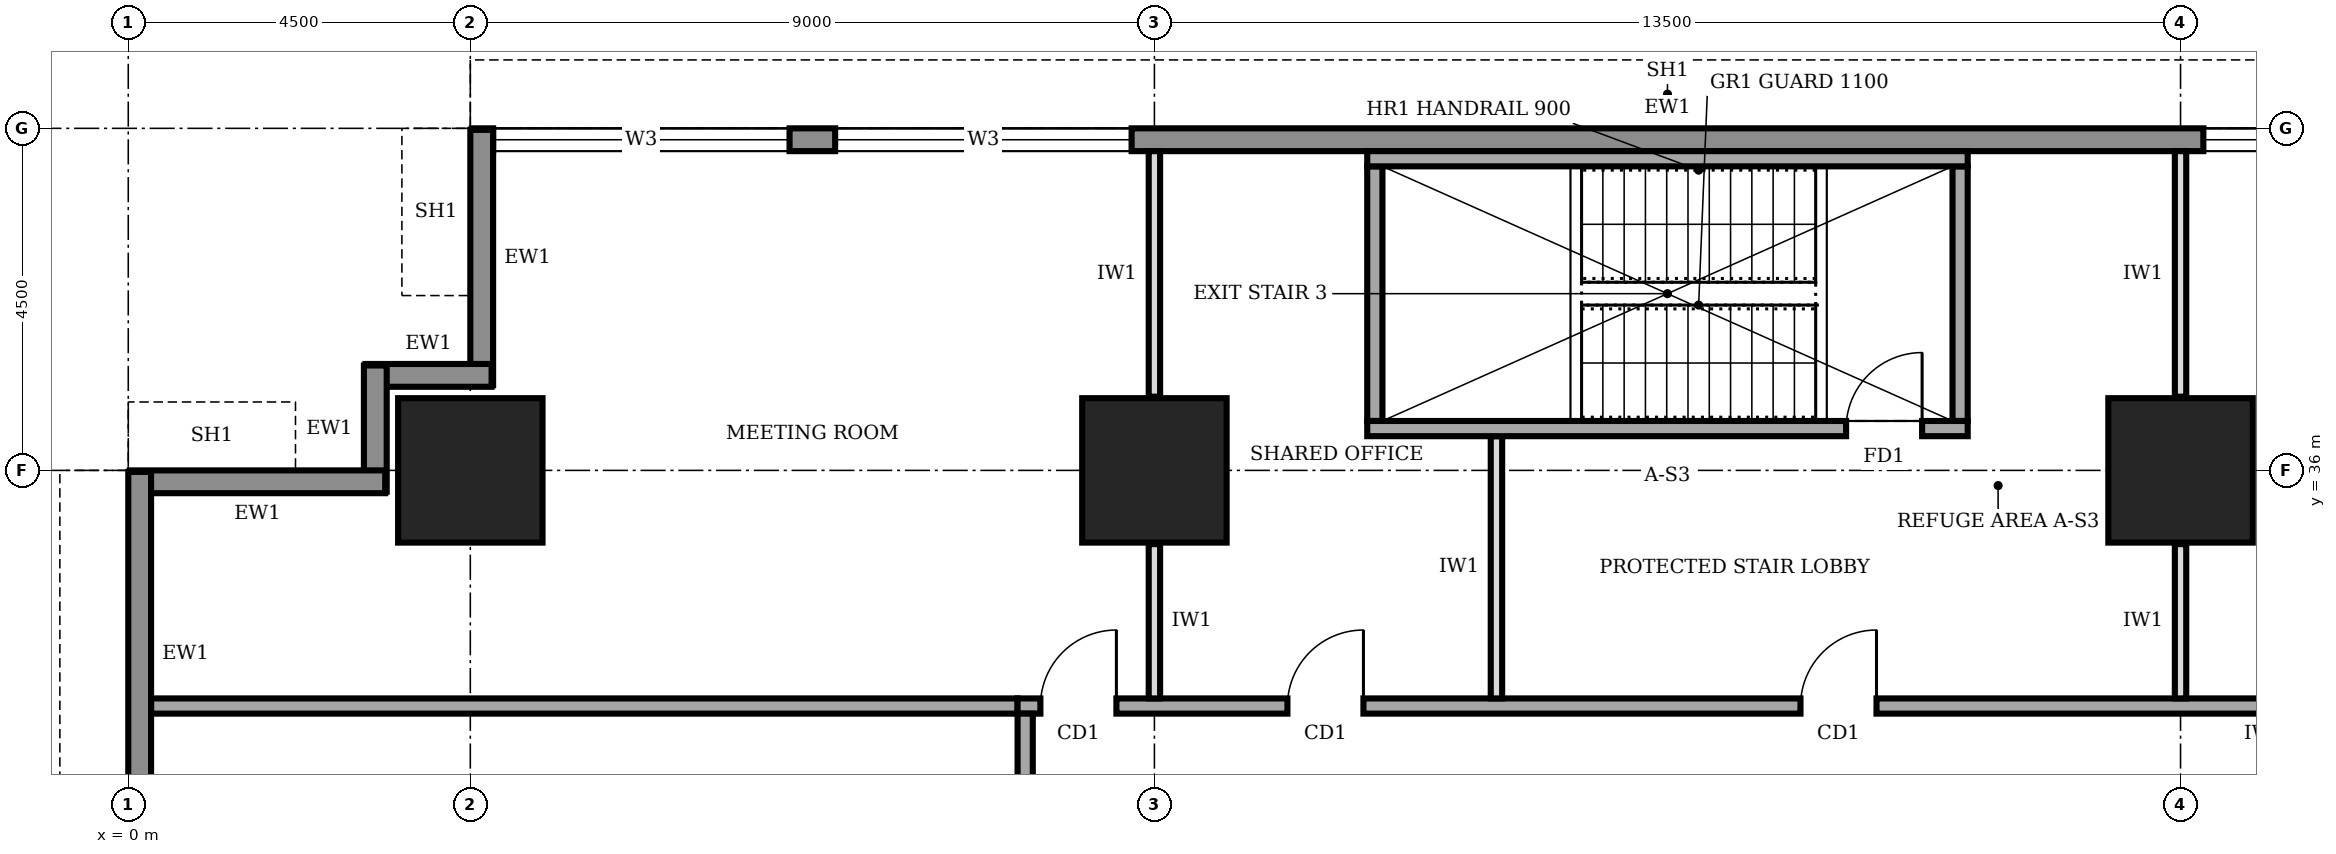
"""IFC4 building model, lengths in metres.
Left out: names, types, materials, properties, quantities, classifications, styles, units other than length and angle.
Written with IfcOpenShell. Run it as: python <this file> out.ifc"""

import sys

from ifc_helpers import new_model, si_unit, direction, frame, frame_2d, origin, origin_2d, place, context, subcontext, project, spatial, rectangle, extrude, element, fill, save


model = new_model("IFC4")
c1 = context("Model", 3, precision=1e-05, world=origin(), true_north=direction((0.0, 1.0)))
c2 = subcontext(c1, "Body", "Model", "MODEL_VIEW")
j1 = project(units=[si_unit("LENGTHUNIT", "METRE"), si_unit("PLANEANGLEUNIT", "RADIAN")], contexts=[c1])
p1 = place(None, origin())
s1 = spatial("IfcSite", under=j1, at=p1, CompositionType="ELEMENT")
p2 = place(p1, origin())
s2 = spatial("IfcBuilding", under=s1, at=p2, CompositionType="ELEMENT")
p3 = place(p2, frame((0.0, 0.0, 85.0)))
s3 = spatial("IfcBuildingStorey", under=s2, at=p3, CompositionType="ELEMENT", Elevation=85.0)
for number, where, z_axis, x_axis in (
    (1, (4.5, 36.0, 0.0), (0.0, 0.0, 1.0), (1.0, 0.0, 0.0)),
    (2, (13.5, 36.0, 0.0), (0.0, 0.0, 1.0), (1.0, 0.0, 0.0)),
    (3, (27.0, 36.0, 0.0), (0.0, 0.0, 1.0), (1.0, 0.0, 0.0)),
):
    element("IfcColumn", number, at=place(p3, frame(where, z_axis=z_axis, x_axis=x_axis)), inside=s3, PredefinedType="COLUMN", context=c2, shape_type="SweptSolid", body=[
        extrude(rectangle(XDim=1.9, YDim=1.9, at=origin_2d()), origin(), (0.0, 0.0, 1.0), 4.0),
    ])
p4 = place(p3, frame((35.98, 40.35, 0.0), z_axis=(0.0, 0.0, 1.0), x_axis=(-1.0, 0.0, 0.0)))
e4 = element("IfcWall", 4, at=p4, inside=s3, PredefinedType="STANDARD", context=c2, shape_type="SweptSolid", body=[
    extrude(rectangle(XDim=31.46, YDim=0.3, at=frame_2d((15.73, 0.0))), origin(), (0.0, 0.0, 1.0), 3.75),
])
p5 = place(p4, frame((27.28, 0.0, 0.95)))
e5 = element("IfcOpeningElement", 5, at=p5, cuts=e4, PredefinedType="OPENING", context=c2, shape_type="SweptSolid", body=[
    extrude(rectangle(XDim=3.9, YDim=1.8, at=frame_2d((1.95, 0.9))), frame((0.0, 0.16, 0.0), z_axis=(0.0, -1.0, 0.0), x_axis=(1.0, 0.0, 0.0)), (0.0, 0.0, 1.0), 0.32),
])
p6 = place(p4, frame((22.78, 0.0, 0.95)))
e6 = element("IfcOpeningElement", 6, at=p6, cuts=e4, PredefinedType="OPENING", context=c2, shape_type="SweptSolid", body=[
    extrude(rectangle(XDim=3.9, YDim=1.8, at=frame_2d((1.95, 0.9))), frame((0.0, 0.16, 0.0), z_axis=(0.0, -1.0, 0.0), x_axis=(1.0, 0.0, 0.0)), (0.0, 0.0, 1.0), 0.32),
])
p7 = place(p4, frame((4.78, 0.0, 0.95)))
e7 = element("IfcOpeningElement", 7, at=p7, cuts=e4, PredefinedType="OPENING", context=c2, shape_type="SweptSolid", body=[
    extrude(rectangle(XDim=3.9, YDim=1.8, at=frame_2d((1.95, 0.9))), frame((0.0, 0.16, 0.0), z_axis=(0.0, -1.0, 0.0), x_axis=(1.0, 0.0, 0.0)), (0.0, 0.0, 1.0), 0.32),
])
p8 = place(p3, frame((4.65, 40.48, 0.0), z_axis=(0.0, 0.0, 1.0), x_axis=(0.0, -1.0, 0.0)))
e8 = element("IfcWall", 8, at=p8, inside=s3, PredefinedType="STANDARD", context=c2, shape_type="SweptSolid", body=[
    extrude(rectangle(XDim=3.36, YDim=0.3, at=frame_2d((1.68, 0.0))), origin(), (0.0, 0.0, 1.0), 2.85),
])
for number, where, z_axis, x_axis in (
    (9, (4.78, 37.25, 0.0), (0.0, 0.0, 1.0), (-1.0, 0.0, 0.0)),
    (10, (3.25, 37.38, 0.0), (0.0, 0.0, 1.0), (0.0, -1.0, 0.0)),
):
    element("IfcWall", number, at=place(p3, frame(where, z_axis=z_axis, x_axis=x_axis)), inside=s3, PredefinedType="STANDARD", context=c2, shape_type="SweptSolid", body=[
        extrude(rectangle(XDim=1.66, YDim=0.3, at=frame_2d((0.83, 0.0))), origin(), (0.0, 0.0, 1.0), 3.75),
    ])
p9 = place(p3, frame((3.38, 35.85, 0.0), z_axis=(0.0, 0.0, 1.0), x_axis=(-1.0, 0.0, 0.0)))
e11 = element("IfcWall", 11, at=p9, inside=s3, PredefinedType="STANDARD", context=c2, shape_type="SweptSolid", body=[
    extrude(rectangle(XDim=3.36, YDim=0.3, at=frame_2d((1.68, 0.0))), origin(), (0.0, 0.0, 1.0), 2.85),
])
p10 = place(p3, frame((0.15, 35.98, 0.0), z_axis=(0.0, 0.0, 1.0), x_axis=(0.0, -1.0, 0.0)))
e12 = element("IfcWall", 12, at=p10, inside=s3, PredefinedType="STANDARD", context=c2, shape_type="SweptSolid", body=[
    extrude(rectangle(XDim=31.46, YDim=0.3, at=frame_2d((15.73, 0.0))), origin(), (0.0, 0.0, 1.0), 3.75),
])
p11 = place(p10, frame((27.28, 0.0, 0.95)))
e13 = element("IfcOpeningElement", 13, at=p11, cuts=e12, PredefinedType="OPENING", context=c2, shape_type="SweptSolid", body=[
    extrude(rectangle(XDim=3.9, YDim=1.8, at=frame_2d((1.95, 0.9))), frame((0.0, 0.16, 0.0), z_axis=(0.0, -1.0, 0.0), x_axis=(1.0, 0.0, 0.0)), (0.0, 0.0, 1.0), 0.32),
])
p12 = place(p10, frame((22.78, 0.0, 0.95)))
e14 = element("IfcOpeningElement", 14, at=p12, cuts=e12, PredefinedType="OPENING", context=c2, shape_type="SweptSolid", body=[
    extrude(rectangle(XDim=3.9, YDim=1.8, at=frame_2d((1.95, 0.9))), frame((0.0, 0.16, 0.0), z_axis=(0.0, -1.0, 0.0), x_axis=(1.0, 0.0, 0.0)), (0.0, 0.0, 1.0), 0.32),
])
p13 = place(p10, frame((18.28, 0.0, 0.95)))
e15 = element("IfcOpeningElement", 15, at=p13, cuts=e12, PredefinedType="OPENING", context=c2, shape_type="SweptSolid", body=[
    extrude(rectangle(XDim=3.9, YDim=1.8, at=frame_2d((1.95, 0.9))), frame((0.0, 0.16, 0.0), z_axis=(0.0, -1.0, 0.0), x_axis=(1.0, 0.0, 0.0)), (0.0, 0.0, 1.0), 0.32),
])
p14 = place(p10, frame((13.78, 0.0, 0.95)))
e16 = element("IfcOpeningElement", 16, at=p14, cuts=e12, PredefinedType="OPENING", context=c2, shape_type="SweptSolid", body=[
    extrude(rectangle(XDim=3.9, YDim=1.8, at=frame_2d((1.95, 0.9))), frame((0.0, 0.16, 0.0), z_axis=(0.0, -1.0, 0.0), x_axis=(1.0, 0.0, 0.0)), (0.0, 0.0, 1.0), 0.32),
])
p15 = place(p10, frame((9.28, 0.0, 0.95)))
e17 = element("IfcOpeningElement", 17, at=p15, cuts=e12, PredefinedType="OPENING", context=c2, shape_type="SweptSolid", body=[
    extrude(rectangle(XDim=3.9, YDim=1.8, at=frame_2d((1.95, 0.9))), frame((0.0, 0.16, 0.0), z_axis=(0.0, -1.0, 0.0), x_axis=(1.0, 0.0, 0.0)), (0.0, 0.0, 1.0), 0.32),
])
p16 = place(p10, frame((4.78, 0.0, 0.95)))
e18 = element("IfcOpeningElement", 18, at=p16, cuts=e12, PredefinedType="OPENING", context=c2, shape_type="SweptSolid", body=[
    extrude(rectangle(XDim=3.9, YDim=1.8, at=frame_2d((1.95, 0.9))), frame((0.0, 0.16, 0.0), z_axis=(0.0, -1.0, 0.0), x_axis=(1.0, 0.0, 0.0)), (0.0, 0.0, 1.0), 0.32),
])
p17 = place(p3, frame((40.2, 32.9, 0.0), z_axis=(0.0, 0.0, 1.0), x_axis=(-1.0, 0.0, 0.0)))
e19 = element("IfcWall", 19, at=p17, inside=s3, PredefinedType="SOLIDWALL", context=c2, shape_type="SweptSolid", body=[
    extrude(rectangle(XDim=28.5, YDim=0.2, at=frame_2d((14.25, 0.0))), origin(), (0.0, 0.0, 1.0), 3.75),
])
p18 = place(p17, frame((27.2, 0.0, 0.0)))
e20 = element("IfcOpeningElement", 20, at=p18, cuts=e19, PredefinedType="OPENING", context=c2, shape_type="SweptSolid", body=[
    extrude(rectangle(XDim=1.0, YDim=2.1, at=frame_2d((0.5, 1.05))), frame((0.0, 0.11, 0.0), z_axis=(0.0, -1.0, 0.0), x_axis=(1.0, 0.0, 0.0)), (0.0, 0.0, 1.0), 0.22),
])
p19 = place(p17, frame((23.95, 0.0, 0.0)))
e21 = element("IfcOpeningElement", 21, at=p19, cuts=e19, PredefinedType="OPENING", context=c2, shape_type="SweptSolid", body=[
    extrude(rectangle(XDim=1.0, YDim=2.1, at=frame_2d((0.5, 1.05))), frame((0.0, 0.11, 0.0), z_axis=(0.0, -1.0, 0.0), x_axis=(1.0, 0.0, 0.0)), (0.0, 0.0, 1.0), 0.22),
])
p20 = place(p17, frame((17.2, 0.0, 0.0)))
e22 = element("IfcOpeningElement", 22, at=p20, cuts=e19, PredefinedType="OPENING", context=c2, shape_type="SweptSolid", body=[
    extrude(rectangle(XDim=1.0, YDim=2.1, at=frame_2d((0.5, 1.05))), frame((0.0, 0.11, 0.0), z_axis=(0.0, -1.0, 0.0), x_axis=(1.0, 0.0, 0.0)), (0.0, 0.0, 1.0), 0.22),
])
p21 = place(p17, frame((6.0, 0.0, 0.0)))
e23 = element("IfcOpeningElement", 23, at=p21, cuts=e19, PredefinedType="OPENING", context=c2, shape_type="SweptSolid", body=[
    extrude(rectangle(XDim=1.0, YDim=2.1, at=frame_2d((0.5, 1.05))), frame((0.0, 0.11, 0.0), z_axis=(0.0, -1.0, 0.0), x_axis=(1.0, 0.0, 0.0)), (0.0, 0.0, 1.0), 0.22),
])
p22 = place(p3, frame((11.8, 32.8, 0.0), z_axis=(0.0, 0.0, 1.0), x_axis=(0.0, -1.0, 0.0)))
e24 = element("IfcWall", 24, at=p22, inside=s3, PredefinedType="SOLIDWALL", context=c2, shape_type="SweptSolid", body=[
    extrude(rectangle(XDim=25.3, YDim=0.2, at=frame_2d((12.65, 0.0))), origin(), (0.0, 0.0, 1.0), 3.75),
])
p23 = place(p22, frame((21.8, 0.0, 0.0)))
e25 = element("IfcOpeningElement", 25, at=p23, cuts=e24, PredefinedType="OPENING", context=c2, shape_type="SweptSolid", body=[
    extrude(rectangle(XDim=1.0, YDim=2.1, at=frame_2d((0.5, 1.05))), frame((0.0, 0.11, 0.0), z_axis=(0.0, -1.0, 0.0), x_axis=(1.0, 0.0, 0.0)), (0.0, 0.0, 1.0), 0.22),
])
p24 = place(p22, frame((17.15, 0.0, 0.0)))
e26 = element("IfcOpeningElement", 26, at=p24, cuts=e24, PredefinedType="OPENING", context=c2, shape_type="SweptSolid", body=[
    extrude(rectangle(XDim=0.9, YDim=2.1, at=frame_2d((0.45, 1.05))), frame((0.0, 0.11, 0.0), z_axis=(0.0, -1.0, 0.0), x_axis=(1.0, 0.0, 0.0)), (0.0, 0.0, 1.0), 0.22),
])
p25 = place(p22, frame((12.35, 0.0, 0.0)))
e27 = element("IfcOpeningElement", 27, at=p25, cuts=e24, PredefinedType="OPENING", context=c2, shape_type="SweptSolid", body=[
    extrude(rectangle(XDim=0.9, YDim=2.1, at=frame_2d((0.45, 1.05))), frame((0.0, 0.11, 0.0), z_axis=(0.0, -1.0, 0.0), x_axis=(1.0, 0.0, 0.0)), (0.0, 0.0, 1.0), 0.22),
])
p26 = place(p22, frame((9.3, 0.0, 0.0)))
e28 = element("IfcOpeningElement", 28, at=p26, cuts=e24, PredefinedType="OPENING", context=c2, shape_type="SweptSolid", body=[
    extrude(rectangle(XDim=0.9, YDim=2.1, at=frame_2d((0.45, 1.05))), frame((0.0, 0.11, 0.0), z_axis=(0.0, -1.0, 0.0), x_axis=(1.0, 0.0, 0.0)), (0.0, 0.0, 1.0), 0.22),
])
p27 = place(p22, frame((6.3, 0.0, 0.0)))
e29 = element("IfcOpeningElement", 29, at=p27, cuts=e24, PredefinedType="OPENING", context=c2, shape_type="SweptSolid", body=[
    extrude(rectangle(XDim=1.0, YDim=2.1, at=frame_2d((0.5, 1.05))), frame((0.0, 0.11, 0.0), z_axis=(0.0, -1.0, 0.0), x_axis=(1.0, 0.0, 0.0)), (0.0, 0.0, 1.0), 0.22),
])
p28 = place(p22, frame((14.4, 0.0, 0.0)))
e30 = element("IfcOpeningElement", 30, at=p28, cuts=e24, PredefinedType="OPENING", context=c2, shape_type="SweptSolid", body=[
    extrude(rectangle(XDim=1.0, YDim=2.1, at=frame_2d((0.5, 1.05))), frame((0.0, 0.11, 0.0), z_axis=(0.0, -1.0, 0.0), x_axis=(1.0, 0.0, 0.0)), (0.0, 0.0, 1.0), 0.22),
])
p29 = place(p22, frame((2.3, 0.0, 0.0)))
e31 = element("IfcOpeningElement", 31, at=p29, cuts=e24, PredefinedType="OPENING", context=c2, shape_type="SweptSolid", body=[
    extrude(rectangle(XDim=1.0, YDim=2.1, at=frame_2d((0.5, 1.05))), frame((0.0, 0.11, 0.0), z_axis=(0.0, -1.0, 0.0), x_axis=(1.0, 0.0, 0.0)), (0.0, 0.0, 1.0), 0.22),
])
p30 = place(p3, frame((0.3, 32.9, 0.0), z_axis=(0.0, 0.0, 1.0), x_axis=(1.0, 0.0, 0.0)))
e32 = element("IfcWall", 32, at=p30, inside=s3, PredefinedType="SOLIDWALL", context=c2, shape_type="SweptSolid", body=[
    extrude(rectangle(XDim=11.4, YDim=0.2, at=frame_2d((5.7, 0.0))), origin(), (0.0, 0.0, 1.0), 3.75),
])
p31 = place(p3, frame((13.5, 33.0, 0.0), z_axis=(0.0, 0.0, 1.0), x_axis=(0.0, 1.0, 0.0)))
e33 = element("IfcWall", 33, at=p31, inside=s3, PredefinedType="PARTITIONING", context=c2, shape_type="SweptSolid", body=[
    extrude(rectangle(XDim=2.03, YDim=0.15, at=frame_2d((1.015, 0.0))), origin(), (0.0, 0.0, 1.0), 2.85),
])
p32 = place(p3, frame((13.5, 36.97, 0.0), z_axis=(0.0, 0.0, 1.0), x_axis=(0.0, 1.0, 0.0)))
e34 = element("IfcWall", 34, at=p32, inside=s3, PredefinedType="PARTITIONING", context=c2, shape_type="SweptSolid", body=[
    extrude(rectangle(XDim=3.23, YDim=0.15, at=frame_2d((1.615, 0.0))), origin(), (0.0, 0.0, 1.0), 2.85),
])
p33 = place(p3, frame((18.0, 33.0, 0.0), z_axis=(0.0, 0.0, 1.0), x_axis=(0.0, 1.0, 0.0)))
e35 = element("IfcWall", 35, at=p33, inside=s3, PredefinedType="PARTITIONING", context=c2, shape_type="SweptSolid", body=[
    extrude(rectangle(XDim=3.45, YDim=0.15, at=frame_2d((1.725, 0.0))), origin(), (0.0, 0.0, 1.0), 3.75),
])
p34 = place(p3, frame((27.0, 33.0, 0.0), z_axis=(0.0, 0.0, 1.0), x_axis=(0.0, 1.0, 0.0)))
e36 = element("IfcWall", 36, at=p34, inside=s3, PredefinedType="PARTITIONING", context=c2, shape_type="SweptSolid", body=[
    extrude(rectangle(XDim=2.03, YDim=0.15, at=frame_2d((1.015, 0.0))), origin(), (0.0, 0.0, 1.0), 2.85),
])
p35 = place(p3, frame((27.0, 36.97, 0.0), z_axis=(0.0, 0.0, 1.0), x_axis=(0.0, 1.0, 0.0)))
e37 = element("IfcWall", 37, at=p35, inside=s3, PredefinedType="PARTITIONING", context=c2, shape_type="SweptSolid", body=[
    extrude(rectangle(XDim=3.23, YDim=0.15, at=frame_2d((1.615, 0.0))), origin(), (0.0, 0.0, 1.0), 2.85),
])
p36 = place(p3, frame((16.3, 36.55, 0.0), z_axis=(0.0, 0.0, 1.0), x_axis=(1.0, 0.0, 0.0)))
e38 = element("IfcWall", 38, at=p36, inside=s3, PredefinedType="SOLIDWALL", context=c2, shape_type="SweptSolid", body=[
    extrude(rectangle(XDim=7.9, YDim=0.2, at=frame_2d((3.95, 0.0))), origin(), (0.0, 0.0, 1.0), 3.75),
])
p37 = place(p36, frame((6.3, 0.0, 0.0)))
e39 = element("IfcOpeningElement", 39, at=p37, cuts=e38, PredefinedType="OPENING", context=c2, shape_type="SweptSolid", body=[
    extrude(rectangle(XDim=1.0, YDim=2.1, at=frame_2d((0.5, 1.05))), frame((0.0, 0.11, 0.0), z_axis=(0.0, -1.0, 0.0), x_axis=(1.0, 0.0, 0.0)), (0.0, 0.0, 1.0), 0.22),
])
p38 = place(p3, frame((16.3, 40.1, 0.0), z_axis=(0.0, 0.0, 1.0), x_axis=(1.0, 0.0, 0.0)))
e40 = element("IfcWall", 40, at=p38, inside=s3, PredefinedType="SOLIDWALL", context=c2, shape_type="SweptSolid", body=[
    extrude(rectangle(XDim=7.9, YDim=0.2, at=frame_2d((3.95, 0.0))), origin(), (0.0, 0.0, 1.0), 3.75),
])
for number, where, z_axis, x_axis in (
    (41, (16.4, 36.65, 0.0), (0.0, 0.0, 1.0), (0.0, 1.0, 0.0)),
    (42, (24.1, 36.65, 0.0), (0.0, 0.0, 1.0), (0.0, 1.0, 0.0)),
):
    element("IfcWall", number, at=place(p3, frame(where, z_axis=z_axis, x_axis=x_axis)), inside=s3, PredefinedType="SOLIDWALL", context=c2, shape_type="SweptSolid", body=[
        extrude(rectangle(XDim=3.35, YDim=0.2, at=frame_2d((1.675, 0.0))), origin(), (0.0, 0.0, 1.0), 3.75),
    ])
p39 = place(p5, origin())
e43 = element("IfcWindow", 43, at=p39, inside=s3, PartitioningType="SINGLE_PANEL", PredefinedType="WINDOW", context=c2, shape_type="SweptSolid", body=[
    extrude(rectangle(XDim=3.9, YDim=1.8, at=frame_2d((1.95, 0.9))), frame((0.0, 0.03, 0.0), z_axis=(0.0, -1.0, 0.0), x_axis=(1.0, 0.0, 0.0)), (0.0, 0.0, 1.0), 0.06),
])
fill(e5, e43)
p40 = place(p6, origin())
e44 = element("IfcWindow", 44, at=p40, inside=s3, PartitioningType="SINGLE_PANEL", PredefinedType="WINDOW", context=c2, shape_type="SweptSolid", body=[
    extrude(rectangle(XDim=3.9, YDim=1.8, at=frame_2d((1.95, 0.9))), frame((0.0, 0.03, 0.0), z_axis=(0.0, -1.0, 0.0), x_axis=(1.0, 0.0, 0.0)), (0.0, 0.0, 1.0), 0.06),
])
fill(e6, e44)
p41 = place(p7, origin())
e45 = element("IfcWindow", 45, at=p41, inside=s3, PartitioningType="SINGLE_PANEL", PredefinedType="WINDOW", context=c2, shape_type="SweptSolid", body=[
    extrude(rectangle(XDim=3.9, YDim=1.8, at=frame_2d((1.95, 0.9))), frame((0.0, 0.03, 0.0), z_axis=(0.0, -1.0, 0.0), x_axis=(1.0, 0.0, 0.0)), (0.0, 0.0, 1.0), 0.06),
])
fill(e7, e45)
p42 = place(p18, frame((1.0, 0.0, 0.0), z_axis=(0.0, 0.0, 1.0), x_axis=(-1.0, 0.0, 0.0)))
e46 = element("IfcDoor", 46, at=p42, inside=s3, OperationType="SINGLE_SWING_RIGHT", PredefinedType="DOOR", context=c2, shape_type="SweptSolid", body=[
    extrude(rectangle(XDim=1.0, YDim=2.1, at=frame_2d((0.5, 1.05))), frame((0.0, 0.025, 0.0), z_axis=(0.0, -1.0, 0.0), x_axis=(1.0, 0.0, 0.0)), (0.0, 0.0, 1.0), 0.05),
])
fill(e20, e46)
p43 = place(p19, frame((1.0, 0.0, 0.0), z_axis=(0.0, 0.0, 1.0), x_axis=(-1.0, 0.0, 0.0)))
e47 = element("IfcDoor", 47, at=p43, inside=s3, OperationType="SINGLE_SWING_RIGHT", PredefinedType="DOOR", context=c2, shape_type="SweptSolid", body=[
    extrude(rectangle(XDim=1.0, YDim=2.1, at=frame_2d((0.5, 1.05))), frame((0.0, 0.025, 0.0), z_axis=(0.0, -1.0, 0.0), x_axis=(1.0, 0.0, 0.0)), (0.0, 0.0, 1.0), 0.05),
])
fill(e21, e47)
p44 = place(p20, frame((1.0, 0.0, 0.0), z_axis=(0.0, 0.0, 1.0), x_axis=(-1.0, 0.0, 0.0)))
e48 = element("IfcDoor", 48, at=p44, inside=s3, OperationType="SINGLE_SWING_RIGHT", PredefinedType="DOOR", context=c2, shape_type="SweptSolid", body=[
    extrude(rectangle(XDim=1.0, YDim=2.1, at=frame_2d((0.5, 1.05))), frame((0.0, 0.025, 0.0), z_axis=(0.0, -1.0, 0.0), x_axis=(1.0, 0.0, 0.0)), (0.0, 0.0, 1.0), 0.05),
])
fill(e22, e48)
p45 = place(p37, origin())
e49 = element("IfcDoor", 49, at=p45, inside=s3, OperationType="SINGLE_SWING_RIGHT", PredefinedType="DOOR", context=c2, shape_type="SweptSolid", body=[
    extrude(rectangle(XDim=1.0, YDim=2.1, at=frame_2d((0.5, 1.05))), frame((0.0, 0.025, 0.0), z_axis=(0.0, -1.0, 0.0), x_axis=(1.0, 0.0, 0.0)), (0.0, 0.0, 1.0), 0.05),
])
fill(e39, e49)
save(model, sys.argv[1])
